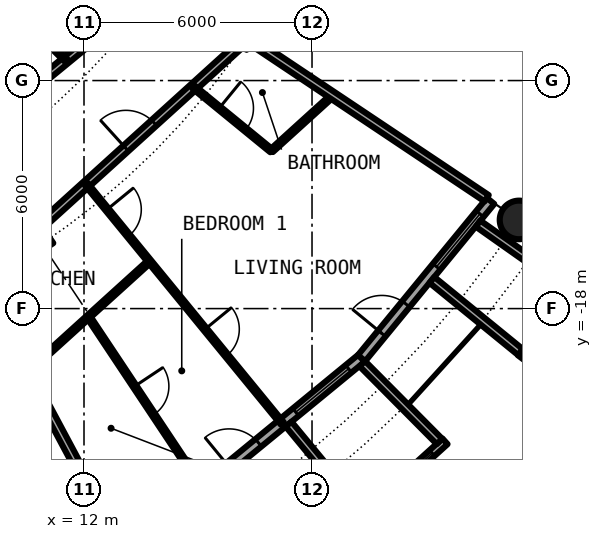
"""IFC4 building model, lengths in metres.
Left out: names, types, materials, properties, quantities, classifications, styles, units other than length and angle.
Written with IfcOpenShell. Run it as: python <this file> out.ifc"""

import sys

from ifc_helpers import new_model, si_unit, direction, frame, frame_2d, origin, origin_2d, place, context, subcontext, project, spatial, rectangle, circle, hollow_circle, i_section, extrude, element, fill, save


model = new_model("IFC4")
c1 = context("Model", 3, precision=1e-05, world=origin(), true_north=direction((0.0, 1.0)))
c2 = subcontext(c1, "Body", "Model", "MODEL_VIEW")
j1 = project(units=[si_unit("LENGTHUNIT", "METRE"), si_unit("PLANEANGLEUNIT", "RADIAN")], contexts=[c1])
p1 = place(None, origin())
s1 = spatial("IfcSite", under=j1, at=p1, CompositionType="ELEMENT")
p2 = place(p1, origin())
s2 = spatial("IfcBuilding", under=s1, at=p2, CompositionType="ELEMENT")
p3 = place(p2, frame((0.0, 0.0, 81.9)))
s3 = spatial("IfcBuildingStorey", under=s2, at=p3, CompositionType="ELEMENT", Elevation=81.9)
p4 = place(p3, frame((23.448, -15.667, 0.0), z_axis=(0.0, 0.0, 1.0), x_axis=(1.0, 0.0, 0.0)))
e1 = element("IfcColumn", 1, at=p4, inside=s3, PredefinedType="COLUMN", context=c2, shape_type="SweptSolid", body=[
    extrude(hollow_circle(Radius=0.508, WallThickness=0.04, at=origin_2d()), origin(), (0.0, 0.0, 1.0), 3.05),
])
p5 = place(p3, frame((10.889, -16.297, 0.0), z_axis=(0.0, 0.0, 1.0), x_axis=(0.55557023302, -0.831469612303, 0.0)))
e2 = element("IfcColumn", 2, at=p5, inside=s3, PredefinedType="COLUMN", context=c2, shape_type="SweptSolid", body=[
    extrude(i_section(OverallWidth=0.306, OverallDepth=0.524, WebThickness=0.021, FlangeThickness=0.04, FilletRadius=0.027, at=origin_2d()), origin(), (0.0, 0.0, 1.0), 3.05),
])
p6 = place(p3, frame((15.167, -22.699, 0.0), z_axis=(0.0, 0.0, 1.0), x_axis=(0.773019449054, 0.634382322723, 0.0)))
e3 = element("IfcWall", 3, at=p6, inside=s3, PredefinedType="SOLIDWALL", context=c2, shape_type="SweptSolid", body=[
    extrude(rectangle(XDim=5.352, YDim=0.25, at=frame_2d((2.676, 0.0))), origin(), (0.0, 0.0, 1.0), 2.7),
])
p7 = place(p6, frame((0.841, 0.0, 0.0)))
e4 = element("IfcOpeningElement", 4, at=p7, cuts=e3, PredefinedType="OPENING", context=c2, shape_type="SweptSolid", body=[
    extrude(rectangle(XDim=1.0, YDim=2.2, at=frame_2d((0.5, 1.1))), frame((0.0, 0.135, 0.0), z_axis=(0.0, -1.0, 0.0), x_axis=(1.0, 0.0, 0.0)), (0.0, 0.0, 1.0), 0.27),
])
p8 = place(p6, frame((3.111, 0.0, 0.3)))
e5 = element("IfcOpeningElement", 5, at=p8, cuts=e3, PredefinedType="OPENING", context=c2, shape_type="SweptSolid", body=[
    extrude(rectangle(XDim=1.8, YDim=2.1, at=frame_2d((0.9, 1.05))), frame((0.0, 0.135, 0.0), z_axis=(0.0, -1.0, 0.0), x_axis=(1.0, 0.0, 0.0)), (0.0, 0.0, 1.0), 0.27),
])
p9 = place(p3, frame((19.282, -23.503, -0.03), z_axis=(0.0, 0.0, 1.0), x_axis=(0.740998365753, 0.671506829416, 0.0)))
e6 = element("IfcWall", 6, at=p9, inside=s3, PredefinedType="SOLIDWALL", context=c2, shape_type="SweptSolid", body=[
    extrude(rectangle(XDim=2.993, YDim=0.2, at=frame_2d((1.497, 0.0))), origin(), (0.0, 0.0, 1.0), 2.73),
])
p10 = place(p9, frame((0.457, 0.0, 0.33)))
e7 = element("IfcOpeningElement", 7, at=p10, cuts=e6, PredefinedType="OPENING", context=c2, shape_type="SweptSolid", body=[
    extrude(circle(Radius=1.04, at=frame_2d((1.04, 1.04))), frame((0.0, 0.11, 0.0), z_axis=(0.0, -1.0, 0.0), x_axis=(1.0, 0.0, 0.0)), (0.0, 0.0, 1.0), 0.22),
])
p11 = place(p3, frame((17.384, -21.041, -0.03), z_axis=(0.0, 0.0, 1.0), x_axis=(0.63709551667, -0.770784861449, 0.0)))
e8 = element("IfcWall", 8, at=p11, inside=s3, PredefinedType="SOLIDWALL", context=c2, shape_type="SweptSolid", body=[
    extrude(rectangle(XDim=3.006, YDim=0.2, at=frame_2d((1.503, 0.0))), origin(), (0.0, 0.0, 1.0), 2.73),
])
p12 = place(p3, frame((19.323, -19.45, -0.03), z_axis=(0.0, 0.0, 1.0), x_axis=(0.704476739375, -0.709727076896, 0.0)))
e9 = element("IfcWall", 9, at=p12, inside=s3, PredefinedType="SOLIDWALL", context=c2, shape_type="SweptSolid", body=[
    extrude(rectangle(XDim=2.883, YDim=0.2, at=frame_2d((1.441, 0.0))), origin(), (0.0, 0.0, 1.0), 2.73),
])
p13 = place(p3, frame((19.304, -19.304, 0.0), z_axis=(0.0, 0.0, 1.0), x_axis=(0.634382322723, 0.773019449054, 0.0)))
e10 = element("IfcWall", 10, at=p13, inside=s3, PredefinedType="SOLIDWALL", context=c2, shape_type="SweptSolid", body=[
    extrude(rectangle(XDim=5.352, YDim=0.25, at=frame_2d((2.676, 0.0))), origin(), (0.0, 0.0, 1.0), 2.7),
])
p14 = place(p13, frame((0.841, 0.0, 0.0)))
e11 = element("IfcOpeningElement", 11, at=p14, cuts=e10, PredefinedType="OPENING", context=c2, shape_type="SweptSolid", body=[
    extrude(rectangle(XDim=1.0, YDim=2.2, at=frame_2d((0.5, 1.1))), frame((0.0, 0.135, 0.0), z_axis=(0.0, -1.0, 0.0), x_axis=(1.0, 0.0, 0.0)), (0.0, 0.0, 1.0), 0.27),
])
p15 = place(p13, frame((3.111, 0.0, 0.3)))
e12 = element("IfcOpeningElement", 12, at=p15, cuts=e10, PredefinedType="OPENING", context=c2, shape_type="SweptSolid", body=[
    extrude(rectangle(XDim=1.8, YDim=2.1, at=frame_2d((0.9, 1.05))), frame((0.0, 0.135, 0.0), z_axis=(0.0, -1.0, 0.0), x_axis=(1.0, 0.0, 0.0)), (0.0, 0.0, 1.0), 0.27),
])
p16 = place(p3, frame((23.497, -19.289, -0.03), z_axis=(0.0, 0.0, 1.0), x_axis=(0.60418752353, 0.796842165306, 0.0)))
e13 = element("IfcWall", 13, at=p16, inside=s3, PredefinedType="SOLIDWALL", context=c2, shape_type="SweptSolid", body=[
    extrude(rectangle(XDim=2.337, YDim=0.2, at=frame_2d((1.168, 0.0))), origin(), (0.0, 0.0, 1.0), 2.73),
])
p17 = place(p16, frame((0.128, 0.0, 0.33)))
e14 = element("IfcOpeningElement", 14, at=p17, cuts=e13, PredefinedType="OPENING", context=c2, shape_type="SweptSolid", body=[
    extrude(circle(Radius=1.04, at=frame_2d((1.04, 1.04))), frame((0.0, 0.11, 0.0), z_axis=(0.0, -1.0, 0.0), x_axis=(1.0, 0.0, 0.0)), (0.0, 0.0, 1.0), 0.22),
])
p18 = place(p3, frame((21.155, -17.246, -0.03), z_axis=(0.0, 0.0, 1.0), x_axis=(0.775179004516, -0.631741648902, 0.0)))
e15 = element("IfcWall", 15, at=p18, inside=s3, PredefinedType="SOLIDWALL", context=c2, shape_type="SweptSolid", body=[
    extrude(rectangle(XDim=3.006, YDim=0.2, at=frame_2d((1.503, 0.0))), origin(), (0.0, 0.0, 1.0), 2.73),
])
p19 = place(p3, frame((22.37, -15.765, -0.03), z_axis=(0.0, 0.0, 1.0), x_axis=(0.817256123454, -0.576274612209, 0.0)))
e16 = element("IfcWall", 16, at=p19, inside=s3, PredefinedType="SOLIDWALL", context=c2, shape_type="SweptSolid", body=[
    extrude(rectangle(XDim=2.933, YDim=0.2, at=frame_2d((1.466, 0.0))), origin(), (0.0, 0.0, 1.0), 2.73),
])
p20 = place(p3, frame((10.513, -19.668, 0.0), z_axis=(0.0, 0.0, 1.0), x_axis=(0.74092137325, 0.671591779775, 0.0)))
e17 = element("IfcWall", 17, at=p20, inside=s3, PredefinedType="PARTITIONING", context=c2, shape_type="SweptSolid", body=[
    extrude(rectangle(XDim=4.342, YDim=0.1, at=frame_2d((2.171, 0.0))), origin(), (0.0, 0.0, 1.0), 2.7),
])
p21 = place(p3, frame((16.936, -13.845, 0.0), z_axis=(0.0, 0.0, 1.0), x_axis=(0.740836325503, 0.671685595212, 0.0)))
e18 = element("IfcWall", 18, at=p21, inside=s3, PredefinedType="PARTITIONING", context=c2, shape_type="SweptSolid", body=[
    extrude(rectangle(XDim=2.168, YDim=0.1, at=frame_2d((1.084, 0.0))), origin(), (0.0, 0.0, 1.0), 2.7),
])
p22 = place(p3, frame((9.239, -17.286, 0.0), z_axis=(0.0, 0.0, 1.0), x_axis=(0.740909940942, 0.671604392044, 0.0)))
e19 = element("IfcWall", 19, at=p22, inside=s3, PredefinedType="PARTITIONING", context=c2, shape_type="SweptSolid", body=[
    extrude(rectangle(XDim=9.367, YDim=0.2, at=frame_2d((4.683, 0.0))), origin(), (0.0, 0.0, 1.0), 2.38),
])
p23 = place(p22, frame((5.215, 0.0, 0.0)))
e20 = element("IfcOpeningElement", 20, at=p23, cuts=e19, PredefinedType="OPENING", context=c2, shape_type="SweptSolid", body=[
    extrude(rectangle(XDim=1.0, YDim=2.3, at=frame_2d((0.5, 1.15))), frame((0.0, 0.11, 0.0), z_axis=(0.0, -1.0, 0.0), x_axis=(1.0, 0.0, 0.0)), (0.0, 0.0, 1.0), 0.22),
])
p24 = place(p3, frame((6.467, -15.614, 0.0), z_axis=(0.0, 0.0, 1.0), x_axis=(0.773074935257, 0.634314704605, 0.0)))
e21 = element("IfcWall", 21, at=p24, inside=s3, PredefinedType="PARTITIONING", context=c2, shape_type="SweptSolid", body=[
    extrude(rectangle(XDim=9.809, YDim=0.2, at=frame_2d((4.904, 0.0))), origin(), (0.0, 0.0, 1.0), 2.7),
])
p25 = place(p24, frame((4.407, 0.0, 0.0)))
e22 = element("IfcOpeningElement", 22, at=p25, cuts=e21, PredefinedType="OPENING", context=c2, shape_type="SweptSolid", body=[
    extrude(rectangle(XDim=1.0, YDim=2.3, at=frame_2d((0.5, 1.15))), frame((0.0, 0.11, 0.0), z_axis=(0.0, -1.0, 0.0), x_axis=(1.0, 0.0, 0.0)), (0.0, 0.0, 1.0), 0.22),
])
p26 = place(p3, frame((9.239, -17.286, 0.0), z_axis=(0.0, 0.0, 1.0), x_axis=(0.471439510802, -0.881898399848, 0.0)))
e23 = element("IfcWall", 23, at=p26, inside=s3, PredefinedType="PARTITIONING", context=c2, shape_type="SweptSolid", body=[
    extrude(rectangle(XDim=7.575, YDim=0.2, at=frame_2d((3.787, 0.0))), origin(), (0.0, 0.0, 1.0), 2.7),
])
p27 = place(p3, frame((9.683, -9.632, 0.0), z_axis=(0.0, 0.0, 1.0), x_axis=(0.708796844581, -0.705412668665, 0.0)))
e24 = element("IfcWall", 24, at=p27, inside=s3, PredefinedType="PARTITIONING", context=c2, shape_type="SweptSolid", body=[
    extrude(rectangle(XDim=2.597, YDim=0.1, at=frame_2d((1.299, 0.0))), origin(), (0.0, 0.0, 1.0), 2.7),
])
p28 = place(p27, frame((0.849, 0.0, 0.0)))
e25 = element("IfcOpeningElement", 25, at=p28, cuts=e24, PredefinedType="OPENING", context=c2, shape_type="SweptSolid", body=[
    extrude(rectangle(XDim=0.9, YDim=2.3, at=frame_2d((0.45, 1.15))), frame((0.0, 0.06, 0.0), z_axis=(0.0, -1.0, 0.0), x_axis=(1.0, 0.0, 0.0)), (0.0, 0.0, 1.0), 0.12),
])
p29 = place(p3, frame((12.062, -14.727, 0.0), z_axis=(0.0, 0.0, 1.0), x_axis=(0.633664062855, -0.773608334654, 0.0)))
e26 = element("IfcWall", 26, at=p29, inside=s3, PredefinedType="PARTITIONING", context=c2, shape_type="SweptSolid", body=[
    extrude(rectangle(XDim=8.138, YDim=0.1, at=frame_2d((4.069, 0.0))), origin(), (0.0, 0.0, 1.0), 2.7),
])
p30 = place(p29, frame((0.861, 0.0, 0.0)))
e27 = element("IfcOpeningElement", 27, at=p30, cuts=e26, PredefinedType="OPENING", context=c2, shape_type="SweptSolid", body=[
    extrude(rectangle(XDim=0.9, YDim=2.3, at=frame_2d((0.45, 1.15))), frame((0.0, 0.06, 0.0), z_axis=(0.0, -1.0, 0.0), x_axis=(1.0, 0.0, 0.0)), (0.0, 0.0, 1.0), 0.12),
])
p31 = place(p29, frame((4.931, 0.0, 0.0)))
e28 = element("IfcOpeningElement", 28, at=p31, cuts=e26, PredefinedType="OPENING", context=c2, shape_type="SweptSolid", body=[
    extrude(rectangle(XDim=0.9, YDim=2.3, at=frame_2d((0.45, 1.15))), frame((0.0, 0.06, 0.0), z_axis=(0.0, -1.0, 0.0), x_axis=(1.0, 0.0, 0.0)), (0.0, 0.0, 1.0), 0.12),
])
p32 = place(p3, frame((12.115, -18.213, 0.0), z_axis=(0.0, 0.0, 1.0), x_axis=(0.553913391217, -0.832574294, 0.0)))
e29 = element("IfcWall", 29, at=p32, inside=s3, PredefinedType="PARTITIONING", context=c2, shape_type="SweptSolid", body=[
    extrude(rectangle(XDim=5.301, YDim=0.1, at=frame_2d((2.65, 0.0))), origin(), (0.0, 0.0, 1.0), 2.7),
])
p33 = place(p32, frame((2.2, 0.0, 0.0)))
e30 = element("IfcOpeningElement", 30, at=p33, cuts=e29, PredefinedType="OPENING", context=c2, shape_type="SweptSolid", body=[
    extrude(rectangle(XDim=0.9, YDim=2.3, at=frame_2d((0.45, 1.15))), frame((0.0, 0.06, 0.0), z_axis=(0.0, -1.0, 0.0), x_axis=(1.0, 0.0, 0.0)), (0.0, 0.0, 1.0), 0.12),
])
p34 = place(p3, frame((14.882, -12.171, 0.0), z_axis=(0.0, 0.0, 1.0), x_axis=(0.774162545943, -0.632986850147, 0.0)))
e31 = element("IfcWall", 31, at=p34, inside=s3, PredefinedType="PARTITIONING", context=c2, shape_type="SweptSolid", body=[
    extrude(rectangle(XDim=2.649, YDim=0.1, at=frame_2d((1.325, 0.0))), origin(), (0.0, 0.0, 1.0), 2.7),
])
p35 = place(p34, frame((0.875, 0.0, 0.0)))
e32 = element("IfcOpeningElement", 32, at=p35, cuts=e31, PredefinedType="OPENING", context=c2, shape_type="SweptSolid", body=[
    extrude(rectangle(XDim=0.9, YDim=2.3, at=frame_2d((0.45, 1.15))), frame((0.0, 0.06, 0.0), z_axis=(0.0, -1.0, 0.0), x_axis=(1.0, 0.0, 0.0)), (0.0, 0.0, 1.0), 0.12),
])
p36 = place(p3, frame((16.515, -11.035, 0.0), z_axis=(0.0, 0.0, 1.0), x_axis=(0.831505405283, -0.555516661303, 0.0)))
e33 = element("IfcWall", 33, at=p36, inside=s3, PredefinedType="PARTITIONING", context=c2, shape_type="SweptSolid", body=[
    extrude(rectangle(XDim=7.312, YDim=0.2, at=frame_2d((3.656, 0.0))), origin(), (0.0, 0.0, 1.0), 2.7),
])
p37 = place(p7, origin())
e34 = element("IfcDoor", 34, at=p37, inside=s3, OperationType="SINGLE_SWING_LEFT", PredefinedType="DOOR", context=c2, shape_type="SweptSolid", body=[
    extrude(rectangle(XDim=1.0, YDim=2.2, at=frame_2d((0.5, 1.1))), frame((0.0, 0.025, 0.0), z_axis=(0.0, -1.0, 0.0), x_axis=(1.0, 0.0, 0.0)), (0.0, 0.0, 1.0), 0.05),
])
fill(e4, e34)
p38 = place(p8, origin())
e35 = element("IfcWindow", 35, at=p38, inside=s3, PartitioningType="SINGLE_PANEL", PredefinedType="WINDOW", context=c2, shape_type="SweptSolid", body=[
    extrude(rectangle(XDim=1.8, YDim=2.1, at=frame_2d((0.9, 1.05))), frame((0.0, 0.03, 0.0), z_axis=(0.0, -1.0, 0.0), x_axis=(1.0, 0.0, 0.0)), (0.0, 0.0, 1.0), 0.06),
])
fill(e5, e35)
p39 = place(p10, origin())
e36 = element("IfcWindow", 36, at=p39, inside=s3, PartitioningType="SINGLE_PANEL", PredefinedType="WINDOW", context=c2, shape_type="SweptSolid", body=[
    extrude(circle(Radius=1.04, at=frame_2d((1.04, 1.04))), frame((0.0, 0.03, 0.0), z_axis=(0.0, -1.0, 0.0), x_axis=(1.0, 0.0, 0.0)), (0.0, 0.0, 1.0), 0.06),
])
fill(e7, e36)
p40 = place(p14, origin())
e37 = element("IfcDoor", 37, at=p40, inside=s3, OperationType="SINGLE_SWING_LEFT", PredefinedType="DOOR", context=c2, shape_type="SweptSolid", body=[
    extrude(rectangle(XDim=1.0, YDim=2.2, at=frame_2d((0.5, 1.1))), frame((0.0, 0.025, 0.0), z_axis=(0.0, -1.0, 0.0), x_axis=(1.0, 0.0, 0.0)), (0.0, 0.0, 1.0), 0.05),
])
fill(e11, e37)
p41 = place(p15, origin())
e38 = element("IfcWindow", 38, at=p41, inside=s3, PartitioningType="SINGLE_PANEL", PredefinedType="WINDOW", context=c2, shape_type="SweptSolid", body=[
    extrude(rectangle(XDim=1.8, YDim=2.1, at=frame_2d((0.9, 1.05))), frame((0.0, 0.03, 0.0), z_axis=(0.0, -1.0, 0.0), x_axis=(1.0, 0.0, 0.0)), (0.0, 0.0, 1.0), 0.06),
])
fill(e12, e38)
p42 = place(p23, origin())
e39 = element("IfcDoor", 39, at=p42, inside=s3, OperationType="SINGLE_SWING_RIGHT", PredefinedType="DOOR", context=c2, shape_type="SweptSolid", body=[
    extrude(rectangle(XDim=1.0, YDim=2.3, at=frame_2d((0.5, 1.15))), frame((0.0, 0.025, 0.0), z_axis=(0.0, -1.0, 0.0), x_axis=(1.0, 0.0, 0.0)), (0.0, 0.0, 1.0), 0.05),
])
fill(e20, e39)
p43 = place(p35, origin())
e40 = element("IfcDoor", 40, at=p43, inside=s3, OperationType="SINGLE_SWING_RIGHT", PredefinedType="DOOR", context=c2, shape_type="SweptSolid", body=[
    extrude(rectangle(XDim=0.9, YDim=2.3, at=frame_2d((0.45, 1.15))), frame((0.0, 0.025, 0.0), z_axis=(0.0, -1.0, 0.0), x_axis=(1.0, 0.0, 0.0)), (0.0, 0.0, 1.0), 0.05),
])
fill(e32, e40)
p44 = place(p30, origin())
e41 = element("IfcDoor", 41, at=p44, inside=s3, OperationType="SINGLE_SWING_LEFT", PredefinedType="DOOR", context=c2, shape_type="SweptSolid", body=[
    extrude(rectangle(XDim=0.9, YDim=2.3, at=frame_2d((0.45, 1.15))), frame((0.0, 0.025, 0.0), z_axis=(0.0, -1.0, 0.0), x_axis=(1.0, 0.0, 0.0)), (0.0, 0.0, 1.0), 0.05),
])
fill(e27, e41)
p45 = place(p31, origin())
e42 = element("IfcDoor", 42, at=p45, inside=s3, OperationType="SINGLE_SWING_RIGHT", PredefinedType="DOOR", context=c2, shape_type="SweptSolid", body=[
    extrude(rectangle(XDim=0.9, YDim=2.3, at=frame_2d((0.45, 1.15))), frame((0.0, 0.025, 0.0), z_axis=(0.0, -1.0, 0.0), x_axis=(1.0, 0.0, 0.0)), (0.0, 0.0, 1.0), 0.05),
])
fill(e28, e42)
p46 = place(p33, origin())
e43 = element("IfcDoor", 43, at=p46, inside=s3, OperationType="SINGLE_SWING_LEFT", PredefinedType="DOOR", context=c2, shape_type="SweptSolid", body=[
    extrude(rectangle(XDim=0.9, YDim=2.3, at=frame_2d((0.45, 1.15))), frame((0.0, 0.025, 0.0), z_axis=(0.0, -1.0, 0.0), x_axis=(1.0, 0.0, 0.0)), (0.0, 0.0, 1.0), 0.05),
])
fill(e30, e43)
save(model, sys.argv[1])
